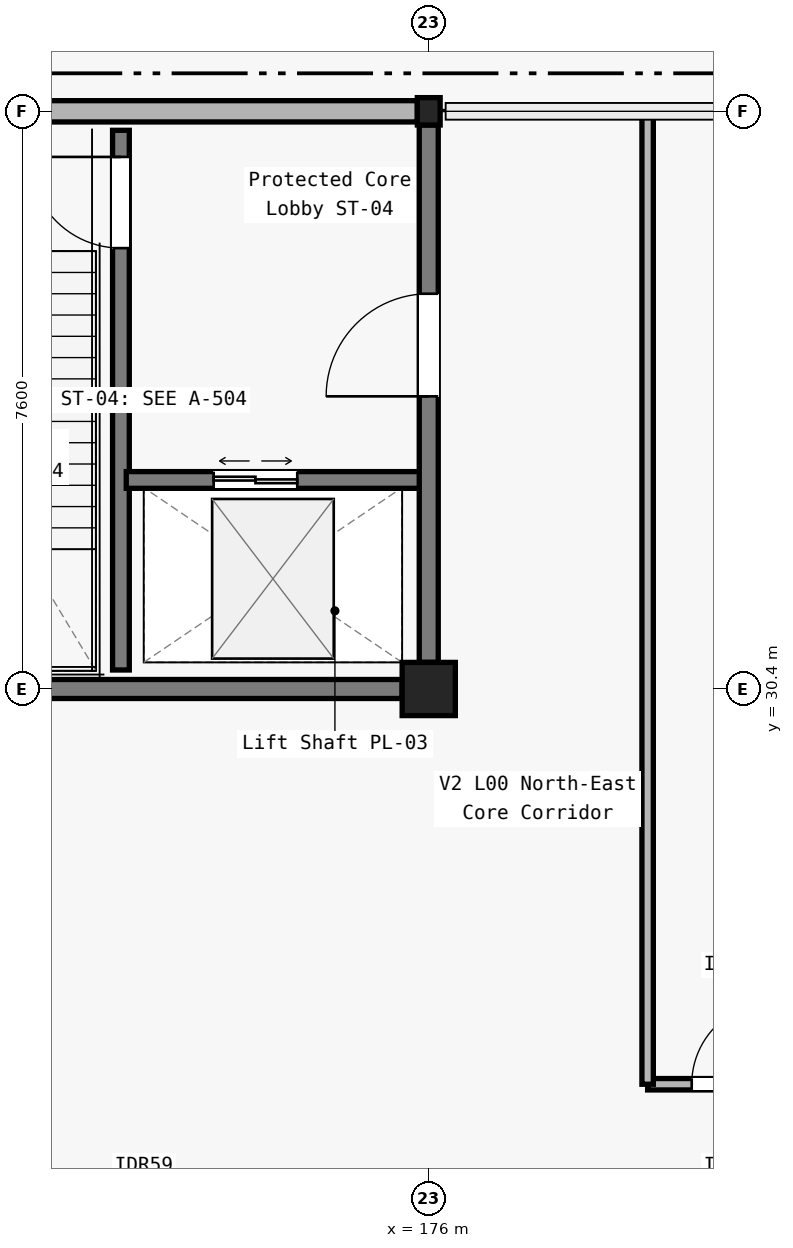
"""IFC4 building model, lengths in metres.
Left out: names, types, materials, properties, quantities, classifications, styles, units other than length and angle.
Written with IfcOpenShell. Run it as: python <this file> out.ifc"""

import sys

from ifc_helpers import new_model, si_unit, direction, frame, frame_2d, origin, origin_2d, place, context, subcontext, project, spatial, rectangle, i_section, extrude, element, fill, save


model = new_model("IFC4")
c1 = context("Model", 3, precision=1e-05, world=origin(), true_north=direction((0.0, 1.0)))
c2 = subcontext(c1, "Body", "Model", "MODEL_VIEW")
j1 = project(units=[si_unit("LENGTHUNIT", "METRE"), si_unit("PLANEANGLEUNIT", "RADIAN")], contexts=[c1])
p1 = place(None, origin())
s1 = spatial("IfcSite", under=j1, at=p1, CompositionType="ELEMENT")
p2 = place(p1, origin())
s2 = spatial("IfcBuilding", under=s1, at=p2, CompositionType="ELEMENT")
p3 = place(p2, origin())
s3 = spatial("IfcBuildingStorey", under=s2, at=p3, CompositionType="ELEMENT", Elevation=0.0)
p4 = place(p3, frame((176.0, 30.4, 0.0), z_axis=(0.0, 0.0, 1.0), x_axis=(1.0, 0.0, 0.0)))
e1 = element("IfcColumn", 1, at=p4, inside=s3, PredefinedType="COLUMN", context=c2, shape_type="SweptSolid", body=[
    extrude(rectangle(XDim=0.7, YDim=0.7, at=origin_2d()), origin(), (0.0, 0.0, 1.0), 5.4),
])
p5 = place(p3, frame((176.0, 38.0, 0.0), z_axis=(0.0, 0.0, 1.0), x_axis=(1.0, 0.0, 0.0)))
e2 = element("IfcColumn", 2, at=p5, inside=s3, PredefinedType="COLUMN", context=c2, shape_type="SweptSolid", body=[
    extrude(i_section(OverallWidth=0.3, OverallDepth=0.36, WebThickness=0.012, FlangeThickness=0.022, FilletRadius=0.027, at=origin_2d()), origin(), (0.0, 0.0, 1.0), 5.4),
])
p6 = place(p3, frame((168.15, 38.0, 0.0), z_axis=(0.0, 0.0, 1.0), x_axis=(1.0, 0.0, 0.0)))
e3 = element("IfcWall", 3, at=p6, inside=s3, PredefinedType="SOLIDWALL", context=c2, shape_type="SweptSolid", body=[
    extrude(rectangle(XDim=7.7, YDim=0.28, at=frame_2d((3.85, 0.0))), origin(), (0.0, 0.0, 1.0), 4.44),
])
p7 = place(p6, frame((0.65, 0.0, 0.0)))
e4 = element("IfcOpeningElement", 4, at=p7, cuts=e3, PredefinedType="OPENING", context=c2, shape_type="SweptSolid", body=[
    extrude(rectangle(XDim=1.5, YDim=2.2, at=frame_2d((0.75, 1.1))), frame((0.0, 0.15, 0.0), z_axis=(0.0, -1.0, 0.0), x_axis=(1.0, 0.0, 0.0)), (0.0, 0.0, 1.0), 0.3),
])
p8 = place(p3, frame((168.4, 30.4, 0.0), z_axis=(0.0, 0.0, 1.0), x_axis=(1.0, 0.0, 0.0)))
e5 = element("IfcWall", 5, at=p8, inside=s3, PredefinedType="SOLIDWALL", context=c2, shape_type="SweptSolid", body=[
    extrude(rectangle(XDim=7.25, YDim=0.25, at=frame_2d((3.625, 0.0))), origin(), (0.0, 0.0, 1.0), 4.24),
])
p9 = place(p3, frame((171.95, 30.65, 0.0), z_axis=(0.0, 0.0, 1.0), x_axis=(0.0, 1.0, 0.0)))
e6 = element("IfcWall", 6, at=p9, inside=s3, PredefinedType="SOLIDWALL", context=c2, shape_type="SweptSolid", body=[
    extrude(rectangle(XDim=7.1, YDim=0.22, at=frame_2d((3.55, 0.0))), origin(), (0.0, 0.0, 1.0), 5.1),
])
p10 = place(p9, frame((5.55, 0.0, 0.0)))
e7 = element("IfcOpeningElement", 7, at=p10, cuts=e6, PredefinedType="OPENING", context=c2, shape_type="SweptSolid", body=[
    extrude(rectangle(XDim=1.2, YDim=2.15, at=frame_2d((0.6, 1.075))), frame((0.0, 0.12, 0.0), z_axis=(0.0, -1.0, 0.0), x_axis=(1.0, 0.0, 0.0)), (0.0, 0.0, 1.0), 0.24),
])
p11 = place(p3, frame((172.02, 33.15, 0.0), z_axis=(0.0, 0.0, 1.0), x_axis=(1.0, 0.0, 0.0)))
e8 = element("IfcWall", 8, at=p11, inside=s3, PredefinedType="SOLIDWALL", context=c2, shape_type="SweptSolid", body=[
    extrude(rectangle(XDim=3.93, YDim=0.22, at=frame_2d((1.965, 0.0))), origin(), (0.0, 0.0, 1.0), 4.4),
])
p12 = place(p11, frame((1.15, 0.0, 0.0)))
e9 = element("IfcOpeningElement", 9, at=p12, cuts=e8, PredefinedType="OPENING", context=c2, shape_type="SweptSolid", body=[
    extrude(rectangle(XDim=1.1, YDim=2.2, at=frame_2d((0.55, 1.1))), frame((0.0, 0.12, 0.0), z_axis=(0.0, -1.0, 0.0), x_axis=(1.0, 0.0, 0.0)), (0.0, 0.0, 1.0), 0.24),
])
p13 = place(p3, frame((176.0, 30.75, 0.0), z_axis=(0.0, 0.0, 1.0), x_axis=(0.0, 1.0, 0.0)))
e10 = element("IfcWall", 10, at=p13, inside=s3, PredefinedType="SOLIDWALL", context=c2, shape_type="SweptSolid", body=[
    extrude(rectangle(XDim=7.07, YDim=0.25, at=frame_2d((3.535, 0.0))), origin(), (0.0, 0.0, 1.0), 4.225),
])
p14 = place(p13, frame((3.5, 0.0, 0.0)))
e11 = element("IfcOpeningElement", 11, at=p14, cuts=e10, PredefinedType="OPENING", context=c2, shape_type="SweptSolid", body=[
    extrude(rectangle(XDim=1.35, YDim=2.2, at=frame_2d((0.675, 1.1))), frame((0.0, 0.135, 0.0), z_axis=(0.0, -1.0, 0.0), x_axis=(1.0, 0.0, 0.0)), (0.0, 0.0, 1.0), 0.27),
])
p15 = place(p3, frame((178.88, 25.2, 0.0), z_axis=(0.0, 0.0, 1.0), x_axis=(1.0, 0.0, 0.0)))
e12 = element("IfcWall", 12, at=p15, inside=s3, PredefinedType="PARTITIONING", context=c2, shape_type="SweptSolid", body=[
    extrude(rectangle(XDim=5.04, YDim=0.15, at=frame_2d((2.52, 0.0))), origin(), (0.0, 0.0, 1.0), 4.47),
])
p16 = place(p15, frame((0.58, 0.0, 0.0)))
e13 = element("IfcOpeningElement", 13, at=p16, cuts=e12, PredefinedType="OPENING", context=c2, shape_type="SweptSolid", body=[
    extrude(rectangle(XDim=1.08, YDim=2.1, at=frame_2d((0.54, 1.05))), frame((0.0, 0.085, 0.0), z_axis=(0.0, -1.0, 0.0), x_axis=(1.0, 0.0, 0.0)), (0.0, 0.0, 1.0), 0.17),
])
p17 = place(p3, frame((178.88, 25.2, 0.0), z_axis=(0.0, 0.0, 1.0), x_axis=(0.0, 1.0, 0.0)))
e14 = element("IfcWall", 14, at=p17, inside=s3, PredefinedType="PARTITIONING", context=c2, shape_type="SweptSolid", body=[
    extrude(rectangle(XDim=12.72, YDim=0.15, at=frame_2d((6.36, 0.0))), origin(), (0.0, 0.0, 1.0), 4.225),
])
p18 = place(p10, origin())
e15 = element("IfcDoor", 15, at=p18, inside=s3, OperationType="SINGLE_SWING_RIGHT", PredefinedType="DOOR", context=c2, shape_type="SweptSolid", body=[
    extrude(rectangle(XDim=1.2, YDim=2.15, at=frame_2d((0.6, 1.075))), frame((0.0, 0.025, 0.0), z_axis=(0.0, -1.0, 0.0), x_axis=(1.0, 0.0, 0.0)), (0.0, 0.0, 1.0), 0.05),
])
fill(e7, e15)
p19 = place(p12, origin())
e16 = element("IfcDoor", 16, at=p19, inside=s3, OperationType="DOUBLE_DOOR_SLIDING", PredefinedType="DOOR", context=c2, shape_type="SweptSolid", body=[
    extrude(rectangle(XDim=1.1, YDim=2.2, at=frame_2d((0.55, 1.1))), frame((0.0, 0.025, 0.0), z_axis=(0.0, -1.0, 0.0), x_axis=(1.0, 0.0, 0.0)), (0.0, 0.0, 1.0), 0.05),
])
fill(e9, e16)
p20 = place(p14, origin())
e17 = element("IfcDoor", 17, at=p20, inside=s3, OperationType="SINGLE_SWING_LEFT", PredefinedType="DOOR", context=c2, shape_type="SweptSolid", body=[
    extrude(rectangle(XDim=1.35, YDim=2.2, at=frame_2d((0.675, 1.1))), frame((0.0, 0.025, 0.0), z_axis=(0.0, -1.0, 0.0), x_axis=(1.0, 0.0, 0.0)), (0.0, 0.0, 1.0), 0.05),
])
fill(e11, e17)
p21 = place(p16, origin())
e18 = element("IfcDoor", 18, at=p21, inside=s3, OperationType="SINGLE_SWING_RIGHT", PredefinedType="DOOR", context=c2, shape_type="SweptSolid", body=[
    extrude(rectangle(XDim=1.08, YDim=2.1, at=frame_2d((0.54, 1.05))), frame((0.0, 0.025, 0.0), z_axis=(0.0, -1.0, 0.0), x_axis=(1.0, 0.0, 0.0)), (0.0, 0.0, 1.0), 0.05),
])
fill(e13, e18)
save(model, sys.argv[1])
